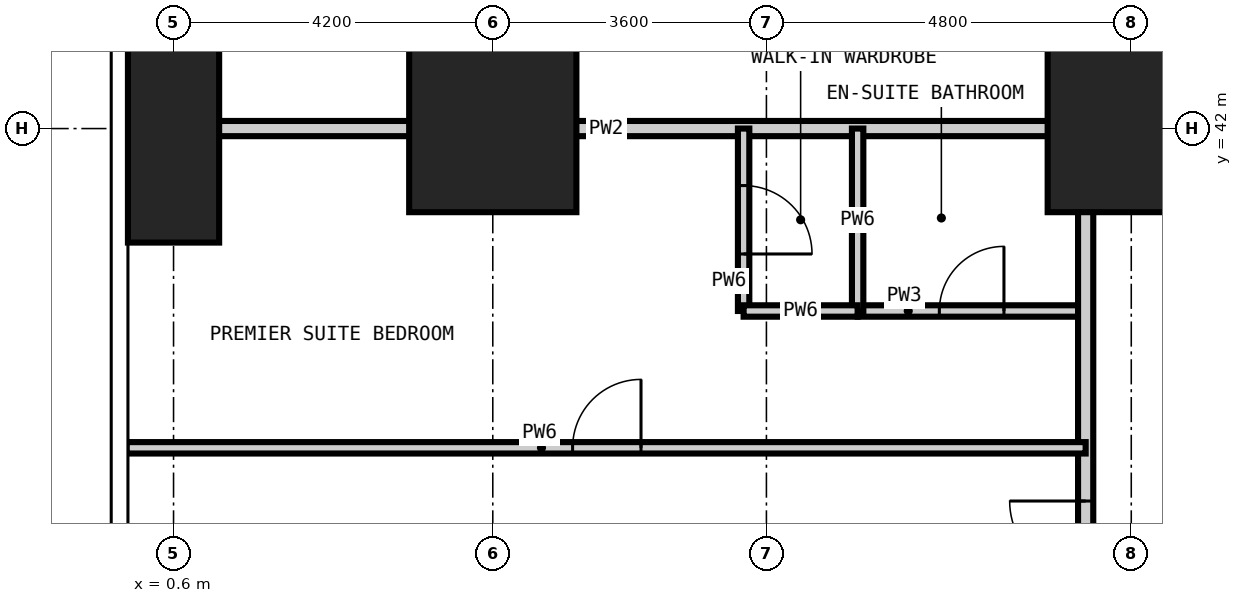
"""IFC4 building model, lengths in metres.
Left out: names, types, materials, properties, quantities, classifications, styles, units other than length and angle.
Written with IfcOpenShell. Run it as: python <this file> out.ifc"""

import sys

from ifc_helpers import new_model, si_unit, direction, frame, frame_2d, origin, origin_2d, place, context, subcontext, project, spatial, rectangle, extrude, element, fill, save


model = new_model("IFC4")
c1 = context("Model", 3, precision=1e-05, world=origin(), true_north=direction((0.0, 1.0)))
c2 = subcontext(c1, "Body", "Model", "MODEL_VIEW")
j1 = project(units=[si_unit("LENGTHUNIT", "METRE"), si_unit("PLANEANGLEUNIT", "RADIAN")], contexts=[c1])
p1 = place(None, origin())
s1 = spatial("IfcSite", under=j1, at=p1, CompositionType="ELEMENT")
p2 = place(p1, origin())
s2 = spatial("IfcBuilding", under=s1, at=p2, CompositionType="ELEMENT")
p3 = place(p2, frame((0.0, 0.0, 93.6)))
s3 = spatial("IfcBuildingStorey", under=s2, at=p3, CompositionType="ELEMENT", Elevation=93.6)
p4 = place(p3, frame((0.6, 42.0, -0.35), z_axis=(0.0, 0.0, 1.0), x_axis=(1.0, 0.0, 0.0)))
e1 = element("IfcColumn", 1, at=p4, inside=s3, PredefinedType="COLUMN", context=c2, shape_type="SweptSolid", body=[
    extrude(rectangle(XDim=1.2, YDim=3.0, at=origin_2d()), origin(), (0.0, 0.0, 1.0), 3.6),
])
for number, where, z_axis, x_axis in (
    (2, (4.8, 42.0, -0.35), (0.0, 0.0, 1.0), (1.0, 0.0, 0.0)),
    (3, (13.2, 42.0, -0.35), (0.0, 0.0, 1.0), (1.0, 0.0, 0.0)),
):
    element("IfcColumn", number, at=place(p3, frame(where, z_axis=z_axis, x_axis=x_axis)), inside=s3, PredefinedType="COLUMN", context=c2, shape_type="SweptSolid", body=[
        extrude(rectangle(XDim=2.2, YDim=2.2, at=origin_2d()), origin(), (0.0, 0.0, 1.0), 3.6),
    ])
p5 = place(p3, frame((9.6, 39.6, 0.0), z_axis=(0.0, 0.0, 1.0), x_axis=(1.0, 0.0, 0.0)))
e4 = element("IfcWall", 4, at=p5, inside=s3, PredefinedType="PARTITIONING", context=c2, shape_type="SweptSolid", body=[
    extrude(rectangle(XDim=3.0, YDim=0.15, at=frame_2d((1.5, 0.0))), origin(), (0.0, 0.0, 1.0), 3.25),
])
p6 = place(p5, frame((1.075, 0.0, 0.0)))
e5 = element("IfcOpeningElement", 5, at=p6, cuts=e4, PredefinedType="OPENING", context=c2, shape_type="SweptSolid", body=[
    extrude(rectangle(XDim=0.85, YDim=2.1, at=frame_2d((0.425, 1.05))), frame((0.0, 0.085, 0.0), z_axis=(0.0, -1.0, 0.0), x_axis=(1.0, 0.0, 0.0)), (0.0, 0.0, 1.0), 0.17),
])
p7 = place(p3, frame((12.6, 13.1, 0.0), z_axis=(0.0, 0.0, 1.0), x_axis=(0.0, 1.0, 0.0)))
e6 = element("IfcWall", 6, at=p7, inside=s3, PredefinedType="PARTITIONING", context=c2, shape_type="SweptSolid", body=[
    extrude(rectangle(XDim=31.4, YDim=0.2, at=frame_2d((15.7, 0.0))), origin(), (0.0, 0.0, 1.0), 3.25),
])
p8 = place(p7, frame((6.2, 0.0, 0.0)))
e7 = element("IfcOpeningElement", 7, at=p8, cuts=e6, PredefinedType="OPENING", context=c2, shape_type="SweptSolid", body=[
    extrude(rectangle(XDim=1.0, YDim=2.2, at=frame_2d((0.5, 1.1))), frame((0.0, 0.11, 0.0), z_axis=(0.0, -1.0, 0.0), x_axis=(1.0, 0.0, 0.0)), (0.0, 0.0, 1.0), 0.22),
])
p9 = place(p7, frame((17.0, 0.0, 0.0)))
e8 = element("IfcOpeningElement", 8, at=p9, cuts=e6, PredefinedType="OPENING", context=c2, shape_type="SweptSolid", body=[
    extrude(rectangle(XDim=1.0, YDim=2.2, at=frame_2d((0.5, 1.1))), frame((0.0, 0.11, 0.0), z_axis=(0.0, -1.0, 0.0), x_axis=(1.0, 0.0, 0.0)), (0.0, 0.0, 1.0), 0.22),
])
p10 = place(p7, frame((23.0, 0.0, 0.0)))
e9 = element("IfcOpeningElement", 9, at=p10, cuts=e6, PredefinedType="OPENING", context=c2, shape_type="SweptSolid", body=[
    extrude(rectangle(XDim=1.0, YDim=2.2, at=frame_2d((0.5, 1.1))), frame((0.0, 0.11, 0.0), z_axis=(0.0, -1.0, 0.0), x_axis=(1.0, 0.0, 0.0)), (0.0, 0.0, 1.0), 0.22),
])
p11 = place(p7, frame((1.35, 0.0, 0.0)))
e10 = element("IfcOpeningElement", 10, at=p11, cuts=e6, PredefinedType="OPENING", context=c2, shape_type="SweptSolid", body=[
    extrude(rectangle(XDim=1.0, YDim=2.2, at=frame_2d((0.5, 1.1))), frame((0.0, 0.11, 0.0), z_axis=(0.0, -1.0, 0.0), x_axis=(1.0, 0.0, 0.0)), (0.0, 0.0, 1.0), 0.22),
])
p12 = place(p7, frame((30.05, 0.0, 0.0)))
e11 = element("IfcOpeningElement", 11, at=p12, cuts=e6, PredefinedType="OPENING", context=c2, shape_type="SweptSolid", body=[
    extrude(rectangle(XDim=1.0, YDim=2.2, at=frame_2d((0.5, 1.1))), frame((0.0, 0.11, 0.0), z_axis=(0.0, -1.0, 0.0), x_axis=(1.0, 0.0, 0.0)), (0.0, 0.0, 1.0), 0.22),
])
p13 = place(p3, frame((-0.018, 42.0, 0.0), z_axis=(0.0, 0.0, 1.0), x_axis=(1.0, 0.0, 0.0)))
e12 = element("IfcWall", 12, at=p13, inside=s3, PredefinedType="PARTITIONING", context=c2, shape_type="SweptSolid", body=[
    extrude(rectangle(XDim=12.618, YDim=0.2, at=frame_2d((6.309, 0.0))), origin(), (0.0, 0.0, 1.0), 3.25),
])
p14 = place(p3, frame((8.1, 39.6, 0.0), z_axis=(0.0, 0.0, 1.0), x_axis=(0.0, 1.0, 0.0)))
e13 = element("IfcWall", 13, at=p14, inside=s3, PredefinedType="PARTITIONING", context=c2, shape_type="SweptSolid", body=[
    extrude(rectangle(XDim=2.4, YDim=0.15, at=frame_2d((1.2, 0.0))), origin(), (0.0, 0.0, 1.0), 3.25),
])
p15 = place(p14, frame((0.75, 0.0, 0.0)))
e14 = element("IfcOpeningElement", 14, at=p15, cuts=e13, PredefinedType="OPENING", context=c2, shape_type="SweptSolid", body=[
    extrude(rectangle(XDim=0.9, YDim=2.1, at=frame_2d((0.45, 1.05))), frame((0.0, 0.085, 0.0), z_axis=(0.0, -1.0, 0.0), x_axis=(1.0, 0.0, 0.0)), (0.0, 0.0, 1.0), 0.17),
])
p16 = place(p3, frame((9.6, 39.6, 0.0), z_axis=(0.0, 0.0, 1.0), x_axis=(0.0, 1.0, 0.0)))
e15 = element("IfcWall", 15, at=p16, inside=s3, PredefinedType="PARTITIONING", context=c2, shape_type="SweptSolid", body=[
    extrude(rectangle(XDim=2.4, YDim=0.15, at=frame_2d((1.2, 0.0))), origin(), (0.0, 0.0, 1.0), 3.25),
])
p17 = place(p3, frame((-0.018, 37.8, 0.0), z_axis=(0.0, 0.0, 1.0), x_axis=(1.0, 0.0, 0.0)))
e16 = element("IfcWall", 16, at=p17, inside=s3, PredefinedType="PARTITIONING", context=c2, shape_type="SweptSolid", body=[
    extrude(rectangle(XDim=12.618, YDim=0.15, at=frame_2d((6.309, 0.0))), origin(), (0.0, 0.0, 1.0), 3.25),
])
p18 = place(p17, frame((5.868, 0.0, 0.0)))
e17 = element("IfcOpeningElement", 17, at=p18, cuts=e16, PredefinedType="OPENING", context=c2, shape_type="SweptSolid", body=[
    extrude(rectangle(XDim=0.9, YDim=2.1, at=frame_2d((0.45, 1.05))), frame((0.0, 0.085, 0.0), z_axis=(0.0, -1.0, 0.0), x_axis=(1.0, 0.0, 0.0)), (0.0, 0.0, 1.0), 0.17),
])
p19 = place(p3, frame((8.1, 39.6, 0.0), z_axis=(0.0, 0.0, 1.0), x_axis=(1.0, 0.0, 0.0)))
e18 = element("IfcWall", 18, at=p19, inside=s3, PredefinedType="PARTITIONING", context=c2, shape_type="SweptSolid", body=[
    extrude(rectangle(XDim=1.5, YDim=0.15, at=frame_2d((0.75, 0.0))), origin(), (0.0, 0.0, 1.0), 3.25),
])
p20 = place(p10, origin())
e19 = element("IfcDoor", 19, at=p20, inside=s3, OperationType="SINGLE_SWING_RIGHT", PredefinedType="DOOR", context=c2, shape_type="SweptSolid", body=[
    extrude(rectangle(XDim=1.0, YDim=2.2, at=frame_2d((0.5, 1.1))), frame((0.0, 0.025, 0.0), z_axis=(0.0, -1.0, 0.0), x_axis=(1.0, 0.0, 0.0)), (0.0, 0.0, 1.0), 0.05),
])
fill(e9, e19)
p21 = place(p18, origin())
e20 = element("IfcDoor", 20, at=p21, inside=s3, OperationType="SINGLE_SWING_RIGHT", PredefinedType="DOOR", context=c2, shape_type="SweptSolid", body=[
    extrude(rectangle(XDim=0.9, YDim=2.1, at=frame_2d((0.45, 1.05))), frame((0.0, 0.025, 0.0), z_axis=(0.0, -1.0, 0.0), x_axis=(1.0, 0.0, 0.0)), (0.0, 0.0, 1.0), 0.05),
])
fill(e17, e20)
p22 = place(p6, origin())
e21 = element("IfcDoor", 21, at=p22, inside=s3, OperationType="SINGLE_SWING_RIGHT", PredefinedType="DOOR", context=c2, shape_type="SweptSolid", body=[
    extrude(rectangle(XDim=0.85, YDim=2.1, at=frame_2d((0.425, 1.05))), frame((0.0, 0.025, 0.0), z_axis=(0.0, -1.0, 0.0), x_axis=(1.0, 0.0, 0.0)), (0.0, 0.0, 1.0), 0.05),
])
fill(e5, e21)
p23 = place(p15, frame((0.9, 0.0, 0.0), z_axis=(0.0, 0.0, 1.0), x_axis=(-1.0, 0.0, 0.0)))
e22 = element("IfcDoor", 22, at=p23, inside=s3, OperationType="SINGLE_SWING_RIGHT", PredefinedType="DOOR", context=c2, shape_type="SweptSolid", body=[
    extrude(rectangle(XDim=0.9, YDim=2.1, at=frame_2d((0.45, 1.05))), frame((0.0, 0.025, 0.0), z_axis=(0.0, -1.0, 0.0), x_axis=(1.0, 0.0, 0.0)), (0.0, 0.0, 1.0), 0.05),
])
fill(e14, e22)
save(model, sys.argv[1])
